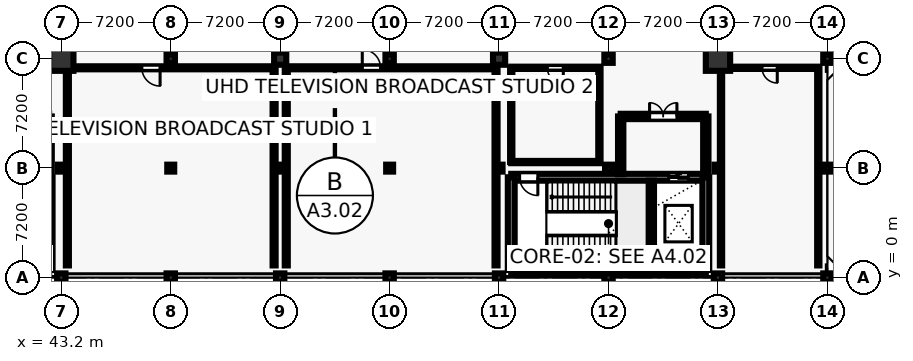
"""IFC4 building model, lengths in metres.
Left out: names, types, materials, properties, quantities, classifications, styles, units other than length and angle.
Written with IfcOpenShell. Run it as: python <this file> out.ifc"""

import sys

from ifc_helpers import new_model, si_unit, direction, frame, frame_2d, origin, origin_2d, place, context, subcontext, project, spatial, rectangle, circle, hollow_circle, extrude, element, fill, save


model = new_model("IFC4")
c1 = context("Model", 3, precision=1e-05, world=origin(), true_north=direction((0.0, 1.0)))
c2 = subcontext(c1, "Body", "Model", "MODEL_VIEW")
j1 = project(units=[si_unit("LENGTHUNIT", "METRE"), si_unit("PLANEANGLEUNIT", "RADIAN")], contexts=[c1])
p1 = place(None, origin())
s1 = spatial("IfcSite", under=j1, at=p1, CompositionType="ELEMENT")
p2 = place(p1, origin())
s2 = spatial("IfcBuilding", under=s1, at=p2, CompositionType="ELEMENT")
p3 = place(p2, frame((0.0, 0.0, 18.6)))
s3 = spatial("IfcBuildingStorey", under=s2, at=p3, CompositionType="ELEMENT", Elevation=18.6)
p4 = place(p3, frame((43.2, 0.0, 0.0), z_axis=(0.0, 0.0, 1.0), x_axis=(1.0, 0.0, 0.0)))
e1 = element("IfcColumn", 1, at=p4, inside=s3, PredefinedType="COLUMN", context=c2, shape_type="SweptSolid", body=[
    extrude(rectangle(XDim=0.55, YDim=0.55, at=origin_2d()), origin(), (0.0, 0.0, 1.0), 4.4),
])
p5 = place(p3, frame((43.2, 7.2, 0.0), z_axis=(0.0, 0.0, 1.0), x_axis=(1.0, 0.0, 0.0)))
e2 = element("IfcColumn", 2, at=p5, inside=s3, PredefinedType="COLUMN", context=c2, shape_type="SweptSolid", body=[
    extrude(hollow_circle(Radius=0.229, WallThickness=0.02, at=origin_2d()), origin(), (0.0, 0.0, 1.0), 4.4),
])
p6 = place(p3, frame((43.2, 14.4, 0.0), z_axis=(0.0, 0.0, 1.0), x_axis=(1.0, 0.0, 0.0)))
e3 = element("IfcColumn", 3, at=p6, inside=s3, PredefinedType="COLUMN", context=c2, shape_type="SweptSolid", body=[
    extrude(circle(Radius=0.8, at=origin_2d()), origin(), (0.0, 0.0, 1.0), 4.4),
])
p7 = place(p3, frame((50.4, 0.0, 0.0), z_axis=(0.0, 0.0, 1.0), x_axis=(1.0, 0.0, 0.0)))
e4 = element("IfcColumn", 4, at=p7, inside=s3, PredefinedType="COLUMN", context=c2, shape_type="SweptSolid", body=[
    extrude(rectangle(XDim=0.55, YDim=0.55, at=origin_2d()), origin(), (0.0, 0.0, 1.0), 4.4),
])
p8 = place(p3, frame((50.4, 7.2, 0.0), z_axis=(0.0, 0.0, 1.0), x_axis=(1.0, 0.0, 0.0)))
e5 = element("IfcColumn", 5, at=p8, inside=s3, PredefinedType="COLUMN", context=c2, shape_type="SweptSolid", body=[
    extrude(hollow_circle(Radius=0.229, WallThickness=0.02, at=origin_2d()), origin(), (0.0, 0.0, 1.0), 4.4),
])
for number, where, z_axis, x_axis in (
    (6, (50.4, 14.4, 0.0), (0.0, 0.0, 1.0), (1.0, 0.0, 0.0)),
    (7, (57.6, 0.0, 0.0), (0.0, 0.0, 1.0), (1.0, 0.0, 0.0)),
):
    element("IfcColumn", number, at=place(p3, frame(where, z_axis=z_axis, x_axis=x_axis)), inside=s3, PredefinedType="COLUMN", context=c2, shape_type="SweptSolid", body=[
        extrude(rectangle(XDim=0.55, YDim=0.55, at=origin_2d()), origin(), (0.0, 0.0, 1.0), 4.4),
    ])
p9 = place(p3, frame((57.6, 7.2, 0.0), z_axis=(0.0, 0.0, 1.0), x_axis=(1.0, 0.0, 0.0)))
e8 = element("IfcColumn", 8, at=p9, inside=s3, PredefinedType="COLUMN", context=c2, shape_type="SweptSolid", body=[
    extrude(hollow_circle(Radius=0.229, WallThickness=0.02, at=origin_2d()), origin(), (0.0, 0.0, 1.0), 4.4),
])
p10 = place(p3, frame((57.6, 14.4, 0.0), z_axis=(0.0, 0.0, 1.0), x_axis=(1.0, 0.0, 0.0)))
e9 = element("IfcColumn", 9, at=p10, inside=s3, PredefinedType="COLUMN", context=c2, shape_type="SweptSolid", body=[
    extrude(circle(Radius=0.4, at=origin_2d()), origin(), (0.0, 0.0, 1.0), 4.4),
])
p11 = place(p3, frame((64.8, 0.0, 0.0), z_axis=(0.0, 0.0, 1.0), x_axis=(1.0, 0.0, 0.0)))
e10 = element("IfcColumn", 10, at=p11, inside=s3, PredefinedType="COLUMN", context=c2, shape_type="SweptSolid", body=[
    extrude(rectangle(XDim=0.55, YDim=0.55, at=origin_2d()), origin(), (0.0, 0.0, 1.0), 4.4),
])
p12 = place(p3, frame((64.8, 7.2, 0.0), z_axis=(0.0, 0.0, 1.0), x_axis=(1.0, 0.0, 0.0)))
e11 = element("IfcColumn", 11, at=p12, inside=s3, PredefinedType="COLUMN", context=c2, shape_type="SweptSolid", body=[
    extrude(hollow_circle(Radius=0.229, WallThickness=0.02, at=origin_2d()), origin(), (0.0, 0.0, 1.0), 4.4),
])
for number, where, z_axis, x_axis in (
    (12, (64.8, 14.4, 0.0), (0.0, 0.0, 1.0), (1.0, 0.0, 0.0)),
    (13, (72.0, 0.0, 0.0), (0.0, 0.0, 1.0), (1.0, 0.0, 0.0)),
):
    element("IfcColumn", number, at=place(p3, frame(where, z_axis=z_axis, x_axis=x_axis)), inside=s3, PredefinedType="COLUMN", context=c2, shape_type="SweptSolid", body=[
        extrude(rectangle(XDim=0.55, YDim=0.55, at=origin_2d()), origin(), (0.0, 0.0, 1.0), 4.4),
    ])
p13 = place(p3, frame((72.0, 7.2, 0.0), z_axis=(0.0, 0.0, 1.0), x_axis=(1.0, 0.0, 0.0)))
e14 = element("IfcColumn", 14, at=p13, inside=s3, PredefinedType="COLUMN", context=c2, shape_type="SweptSolid", body=[
    extrude(hollow_circle(Radius=0.229, WallThickness=0.02, at=origin_2d()), origin(), (0.0, 0.0, 1.0), 4.4),
])
p14 = place(p3, frame((72.0, 14.4, 0.0), z_axis=(0.0, 0.0, 1.0), x_axis=(1.0, 0.0, 0.0)))
e15 = element("IfcColumn", 15, at=p14, inside=s3, PredefinedType="COLUMN", context=c2, shape_type="SweptSolid", body=[
    extrude(circle(Radius=0.4, at=origin_2d()), origin(), (0.0, 0.0, 1.0), 4.4),
])
p15 = place(p3, frame((79.2, 0.0, 0.0), z_axis=(0.0, 0.0, 1.0), x_axis=(1.0, 0.0, 0.0)))
e16 = element("IfcColumn", 16, at=p15, inside=s3, PredefinedType="COLUMN", context=c2, shape_type="SweptSolid", body=[
    extrude(rectangle(XDim=0.55, YDim=0.55, at=origin_2d()), origin(), (0.0, 0.0, 1.0), 4.4),
])
p16 = place(p3, frame((79.2, 7.2, 0.0), z_axis=(0.0, 0.0, 1.0), x_axis=(1.0, 0.0, 0.0)))
e17 = element("IfcColumn", 17, at=p16, inside=s3, PredefinedType="COLUMN", context=c2, shape_type="SweptSolid", body=[
    extrude(hollow_circle(Radius=0.229, WallThickness=0.02, at=origin_2d()), origin(), (0.0, 0.0, 1.0), 4.4),
])
for number, where, z_axis, x_axis in (
    (18, (79.2, 14.4, 0.0), (0.0, 0.0, 1.0), (1.0, 0.0, 0.0)),
    (19, (86.4, 0.0, 0.0), (0.0, 0.0, 1.0), (1.0, 0.0, 0.0)),
):
    element("IfcColumn", number, at=place(p3, frame(where, z_axis=z_axis, x_axis=x_axis)), inside=s3, PredefinedType="COLUMN", context=c2, shape_type="SweptSolid", body=[
        extrude(rectangle(XDim=0.55, YDim=0.55, at=origin_2d()), origin(), (0.0, 0.0, 1.0), 4.4),
    ])
p17 = place(p3, frame((86.4, 7.2, 0.0), z_axis=(0.0, 0.0, 1.0), x_axis=(1.0, 0.0, 0.0)))
e20 = element("IfcColumn", 20, at=p17, inside=s3, PredefinedType="COLUMN", context=c2, shape_type="SweptSolid", body=[
    extrude(hollow_circle(Radius=0.229, WallThickness=0.02, at=origin_2d()), origin(), (0.0, 0.0, 1.0), 4.4),
])
p18 = place(p3, frame((86.4, 14.4, 0.0), z_axis=(0.0, 0.0, 1.0), x_axis=(1.0, 0.0, 0.0)))
e21 = element("IfcColumn", 21, at=p18, inside=s3, PredefinedType="COLUMN", context=c2, shape_type="SweptSolid", body=[
    extrude(circle(Radius=0.8, at=origin_2d()), origin(), (0.0, 0.0, 1.0), 4.4),
])
p19 = place(p3, frame((93.6, 0.0, 0.0), z_axis=(0.0, 0.0, 1.0), x_axis=(1.0, 0.0, 0.0)))
e22 = element("IfcColumn", 22, at=p19, inside=s3, PredefinedType="COLUMN", context=c2, shape_type="SweptSolid", body=[
    extrude(rectangle(XDim=0.55, YDim=0.55, at=origin_2d()), origin(), (0.0, 0.0, 1.0), 4.4),
])
p20 = place(p3, frame((93.6, 7.2, 0.0), z_axis=(0.0, 0.0, 1.0), x_axis=(1.0, 0.0, 0.0)))
e23 = element("IfcColumn", 23, at=p20, inside=s3, PredefinedType="COLUMN", context=c2, shape_type="SweptSolid", body=[
    extrude(hollow_circle(Radius=0.229, WallThickness=0.02, at=origin_2d()), origin(), (0.0, 0.0, 1.0), 4.4),
])
p21 = place(p3, frame((93.6, 14.4, 0.0), z_axis=(0.0, 0.0, 1.0), x_axis=(1.0, 0.0, 0.0)))
e24 = element("IfcColumn", 24, at=p21, inside=s3, PredefinedType="COLUMN", context=c2, shape_type="SweptSolid", body=[
    extrude(rectangle(XDim=0.55, YDim=0.55, at=origin_2d()), origin(), (0.0, 0.0, 1.0), 4.4),
])
p22 = place(p3, frame((42.4, 0.5, 0.0), z_axis=(0.0, 0.0, 1.0), x_axis=(0.0, 1.0, 0.0)))
e25 = element("IfcWall", 25, at=p22, inside=s3, PredefinedType="SHEAR", context=c2, shape_type="SweptSolid", body=[
    extrude(rectangle(XDim=6.1, YDim=0.45, at=frame_2d((3.05, 0.0))), origin(), (0.0, 0.0, 1.0), 4.15),
])
p23 = place(p3, frame((72.8, 0.5, 0.0), z_axis=(0.0, 0.0, 1.0), x_axis=(1.0, 0.0, 0.0)))
e26 = element("IfcWall", 26, at=p23, inside=s3, PredefinedType="SHEAR", context=c2, shape_type="SweptSolid", body=[
    extrude(rectangle(XDim=12.8, YDim=0.45, at=frame_2d((6.4, 0.0))), origin(), (0.0, 0.0, 1.0), 4.15),
])
p24 = place(p3, frame((72.8, 6.6, 0.0), z_axis=(0.0, 0.0, 1.0), x_axis=(1.0, 0.0, 0.0)))
e27 = element("IfcWall", 27, at=p24, inside=s3, PredefinedType="SHEAR", context=c2, shape_type="SweptSolid", body=[
    extrude(rectangle(XDim=12.8, YDim=0.45, at=frame_2d((6.4, 0.0))), origin(), (0.0, 0.0, 1.0), 4.15),
])
p25 = place(p24, frame((0.55, 0.0, 0.0)))
e28 = element("IfcOpeningElement", 28, at=p25, cuts=e27, PredefinedType="OPENING", context=c2, shape_type="SweptSolid", body=[
    extrude(rectangle(XDim=1.2, YDim=2.25, at=frame_2d((0.6, 1.125))), frame((0.0, 0.235, 0.0), z_axis=(0.0, -1.0, 0.0), x_axis=(1.0, 0.0, 0.0)), (0.0, 0.0, 1.0), 0.47),
])
p26 = place(p24, frame((10.358, 0.0, 0.0)))
e29 = element("IfcOpeningElement", 29, at=p26, cuts=e27, PredefinedType="OPENING", context=c2, shape_type="SweptSolid", body=[
    extrude(rectangle(XDim=1.3, YDim=2.25, at=frame_2d((0.65, 1.125))), frame((0.0, 0.235, 0.0), z_axis=(0.0, -1.0, 0.0), x_axis=(1.0, 0.0, 0.0)), (0.0, 0.0, 1.0), 0.47),
])
for number, where, z_axis, x_axis in (
    (30, (72.8, 0.5, 0.0), (0.0, 0.0, 1.0), (0.0, 1.0, 0.0)),
    (31, (85.6, 0.5, 0.0), (0.0, 0.0, 1.0), (0.0, 1.0, 0.0)),
):
    element("IfcWall", number, at=place(p3, frame(where, z_axis=z_axis, x_axis=x_axis)), inside=s3, PredefinedType="SHEAR", context=c2, shape_type="SweptSolid", body=[
        extrude(rectangle(XDim=6.1, YDim=0.45, at=frame_2d((3.05, 0.0))), origin(), (0.0, 0.0, 1.0), 4.15),
    ])
p27 = place(p3, frame((82.016, 0.725, 0.0), z_axis=(0.0, 0.0, 1.0), x_axis=(0.0, 1.0, 0.0)))
e32 = element("IfcWall", 32, at=p27, inside=s3, PredefinedType="SHEAR", context=c2, shape_type="SweptSolid", body=[
    extrude(rectangle(XDim=5.65, YDim=0.35, at=frame_2d((2.825, 0.0))), origin(), (0.0, 0.0, 1.0), 4.15),
])
p28 = place(p3, frame((93.95, 14.4, 0.0), z_axis=(0.0, 0.0, 1.0), x_axis=(1.0, 0.0, 0.0)))
e33 = element("IfcWall", 33, at=p28, inside=s3, PredefinedType="SOLIDWALL", context=c2, shape_type="SweptSolid", body=[
    extrude(rectangle(XDim=13.7, YDim=0.32, at=frame_2d((6.85, 0.0))), origin(), (0.0, 0.0, 1.0), 3.21),
])
p29 = place(p3, frame((93.75, 0.15, 0.0), z_axis=(0.0, 0.0, 1.0), x_axis=(1.0, 0.0, 0.0)))
e34 = element("IfcWall", 34, at=p29, inside=s3, PredefinedType="PARAPET", context=c2, shape_type="SweptSolid", body=[
    extrude(rectangle(XDim=28.5, YDim=0.18, at=frame_2d((14.25, 0.0))), origin(), (0.0, 0.0, 1.0), 1.15),
])
p30 = place(p3, frame((85.6, 6.8, 0.0), z_axis=(0.0, 0.0, 1.0), x_axis=(0.0, 1.0, 0.0)))
e35 = element("IfcWall", 35, at=p30, inside=s3, PredefinedType="SHEAR", context=c2, shape_type="SweptSolid", body=[
    extrude(rectangle(XDim=3.8, YDim=0.35, at=frame_2d((1.9, 0.0))), origin(), (0.0, 0.0, 1.0), 3.21),
])
p31 = place(p3, frame((85.6, 10.6, 0.0), z_axis=(0.0, 0.0, 1.0), x_axis=(-1.0, 0.0, 0.0)))
e36 = element("IfcWall", 36, at=p31, inside=s3, PredefinedType="SHEAR", context=c2, shape_type="SweptSolid", body=[
    extrude(rectangle(XDim=5.6, YDim=0.35, at=frame_2d((2.8, 0.0))), origin(), (0.0, 0.0, 1.0), 3.21),
])
p32 = place(p31, frame((1.9, 0.0, 0.0)))
e37 = element("IfcOpeningElement", 37, at=p32, cuts=e36, PredefinedType="OPENING", context=c2, shape_type="SweptSolid", body=[
    extrude(rectangle(XDim=1.8, YDim=2.3, at=frame_2d((0.9, 1.15))), frame((0.0, 0.185, 0.0), z_axis=(0.0, -1.0, 0.0), x_axis=(1.0, 0.0, 0.0)), (0.0, 0.0, 1.0), 0.37),
])
p33 = place(p3, frame((80.0, 10.6, 0.0), z_axis=(0.0, 0.0, 1.0), x_axis=(0.0, -1.0, 0.0)))
e38 = element("IfcWall", 38, at=p33, inside=s3, PredefinedType="SHEAR", context=c2, shape_type="SweptSolid", body=[
    extrude(rectangle(XDim=3.8, YDim=0.35, at=frame_2d((1.9, 0.0))), origin(), (0.0, 0.0, 1.0), 3.21),
])
p34 = place(p3, frame((57.2, 0.8, 0.0), z_axis=(0.0, 0.0, 1.0), x_axis=(0.0, 1.0, 0.0)))
e39 = element("IfcWall", 39, at=p34, inside=s3, PredefinedType="PARTITIONING", context=c2, shape_type="SweptSolid", body=[
    extrude(rectangle(XDim=13.0, YDim=0.2, at=frame_2d((6.5, 0.0))), origin(), (0.0, 0.0, 1.0), 3.21),
])
p35 = place(p3, frame((57.2, 13.8, 0.0), z_axis=(0.0, 0.0, 1.0), x_axis=(-1.0, 0.0, 0.0)))
e40 = element("IfcWall", 40, at=p35, inside=s3, PredefinedType="PARTITIONING", context=c2, shape_type="SweptSolid", body=[
    extrude(rectangle(XDim=13.6, YDim=0.2, at=frame_2d((6.8, 0.0))), origin(), (0.0, 0.0, 1.0), 3.21),
])
p36 = place(p35, frame((7.5, 0.0, 0.0)))
e41 = element("IfcOpeningElement", 41, at=p36, cuts=e40, PredefinedType="OPENING", context=c2, shape_type="SweptSolid", body=[
    extrude(rectangle(XDim=1.2, YDim=2.25, at=frame_2d((0.6, 1.125))), frame((0.0, 0.11, 0.0), z_axis=(0.0, -1.0, 0.0), x_axis=(1.0, 0.0, 0.0)), (0.0, 0.0, 1.0), 0.22),
])
for number, where, z_axis, x_axis in (
    (42, (43.6, 13.8, 0.0), (0.0, 0.0, 1.0), (0.0, -1.0, 0.0)),
    (43, (71.8, 0.8, 0.0), (0.0, 0.0, 1.0), (0.0, 1.0, 0.0)),
):
    element("IfcWall", number, at=place(p3, frame(where, z_axis=z_axis, x_axis=x_axis)), inside=s3, PredefinedType="PARTITIONING", context=c2, shape_type="SweptSolid", body=[
        extrude(rectangle(XDim=13.0, YDim=0.2, at=frame_2d((6.5, 0.0))), origin(), (0.0, 0.0, 1.0), 3.21),
    ])
p37 = place(p3, frame((71.8, 13.8, 0.0), z_axis=(0.0, 0.0, 1.0), x_axis=(-1.0, 0.0, 0.0)))
e44 = element("IfcWall", 44, at=p37, inside=s3, PredefinedType="PARTITIONING", context=c2, shape_type="SweptSolid", body=[
    extrude(rectangle(XDim=13.8, YDim=0.2, at=frame_2d((6.9, 0.0))), origin(), (0.0, 0.0, 1.0), 3.21),
])
p38 = place(p37, frame((7.6, 0.0, 0.0)))
e45 = element("IfcOpeningElement", 45, at=p38, cuts=e44, PredefinedType="OPENING", context=c2, shape_type="SweptSolid", body=[
    extrude(rectangle(XDim=1.2, YDim=2.25, at=frame_2d((0.6, 1.125))), frame((0.0, 0.11, 0.0), z_axis=(0.0, -1.0, 0.0), x_axis=(1.0, 0.0, 0.0)), (0.0, 0.0, 1.0), 0.22),
])
p39 = place(p3, frame((58.0, 13.8, 0.0), z_axis=(0.0, 0.0, 1.0), x_axis=(0.0, -1.0, 0.0)))
e46 = element("IfcWall", 46, at=p39, inside=s3, PredefinedType="PARTITIONING", context=c2, shape_type="SweptSolid", body=[
    extrude(rectangle(XDim=13.0, YDim=0.2, at=frame_2d((6.5, 0.0))), origin(), (0.0, 0.0, 1.0), 3.21),
])
p40 = place(p3, frame((93.0, 0.8, 0.0), z_axis=(0.0, 0.0, 1.0), x_axis=(0.0, 1.0, 0.0)))
e47 = element("IfcWall", 47, at=p40, inside=s3, PredefinedType="PARTITIONING", context=c2, shape_type="SweptSolid", body=[
    extrude(rectangle(XDim=13.0, YDim=0.15, at=frame_2d((6.5, 0.0))), origin(), (0.0, 0.0, 1.0), 3.21),
])
p41 = place(p3, frame((93.0, 13.8, 0.0), z_axis=(0.0, 0.0, 1.0), x_axis=(-1.0, 0.0, 0.0)))
e48 = element("IfcWall", 48, at=p41, inside=s3, PredefinedType="PARTITIONING", context=c2, shape_type="SweptSolid", body=[
    extrude(rectangle(XDim=6.4, YDim=0.15, at=frame_2d((3.2, 0.0))), origin(), (0.0, 0.0, 1.0), 3.21),
])
p42 = place(p41, frame((2.7, 0.0, 0.0)))
e49 = element("IfcOpeningElement", 49, at=p42, cuts=e48, PredefinedType="OPENING", context=c2, shape_type="SweptSolid", body=[
    extrude(rectangle(XDim=1.0, YDim=2.2, at=frame_2d((0.5, 1.1))), frame((0.0, 0.085, 0.0), z_axis=(0.0, -1.0, 0.0), x_axis=(1.0, 0.0, 0.0)), (0.0, 0.0, 1.0), 0.17),
])
p43 = place(p3, frame((86.6, 13.8, 0.0), z_axis=(0.0, 0.0, 1.0), x_axis=(0.0, -1.0, 0.0)))
e50 = element("IfcWall", 50, at=p43, inside=s3, PredefinedType="PARTITIONING", context=c2, shape_type="SweptSolid", body=[
    extrude(rectangle(XDim=13.0, YDim=0.15, at=frame_2d((6.5, 0.0))), origin(), (0.0, 0.0, 1.0), 3.21),
])
p44 = place(p3, frame((72.8, 7.6, 0.0), z_axis=(0.0, 0.0, 1.0), x_axis=(1.0, 0.0, 0.0)))
e51 = element("IfcWall", 51, at=p44, inside=s3, PredefinedType="PARTITIONING", context=c2, shape_type="SweptSolid", body=[
    extrude(rectangle(XDim=5.8, YDim=0.15, at=frame_2d((2.9, 0.0))), origin(), (0.0, 0.0, 1.0), 3.21),
])
p45 = place(p3, frame((78.6, 7.6, 0.0), z_axis=(0.0, 0.0, 1.0), x_axis=(0.0, 1.0, 0.0)))
e52 = element("IfcWall", 52, at=p45, inside=s3, PredefinedType="PARTITIONING", context=c2, shape_type="SweptSolid", body=[
    extrude(rectangle(XDim=6.2, YDim=0.15, at=frame_2d((3.1, 0.0))), origin(), (0.0, 0.0, 1.0), 3.21),
])
p46 = place(p3, frame((78.6, 13.8, 0.0), z_axis=(0.0, 0.0, 1.0), x_axis=(-1.0, 0.0, 0.0)))
e53 = element("IfcWall", 53, at=p46, inside=s3, PredefinedType="PARTITIONING", context=c2, shape_type="SweptSolid", body=[
    extrude(rectangle(XDim=5.8, YDim=0.15, at=frame_2d((2.9, 0.0))), origin(), (0.0, 0.0, 1.0), 3.21),
])
p47 = place(p46, frame((2.375, 0.0, 0.0)))
e54 = element("IfcOpeningElement", 54, at=p47, cuts=e53, PredefinedType="OPENING", context=c2, shape_type="SweptSolid", body=[
    extrude(rectangle(XDim=1.05, YDim=2.2, at=frame_2d((0.525, 1.1))), frame((0.0, 0.085, 0.0), z_axis=(0.0, -1.0, 0.0), x_axis=(1.0, 0.0, 0.0)), (0.0, 0.0, 1.0), 0.17),
])
p48 = place(p3, frame((72.8, 13.8, 0.0), z_axis=(0.0, 0.0, 1.0), x_axis=(0.0, -1.0, 0.0)))
e55 = element("IfcWall", 55, at=p48, inside=s3, PredefinedType="PARTITIONING", context=c2, shape_type="SweptSolid", body=[
    extrude(rectangle(XDim=6.2, YDim=0.15, at=frame_2d((3.1, 0.0))), origin(), (0.0, 0.0, 1.0), 3.21),
])
p49 = place(p25, frame((1.2, 0.0, 0.0), z_axis=(0.0, 0.0, 1.0), x_axis=(-1.0, 0.0, 0.0)))
e56 = element("IfcDoor", 56, at=p49, inside=s3, OperationType="SINGLE_SWING_RIGHT", PredefinedType="DOOR", context=c2, shape_type="SweptSolid", body=[
    extrude(rectangle(XDim=1.2, YDim=2.25, at=frame_2d((0.6, 1.125))), frame((0.0, 0.025, 0.0), z_axis=(0.0, -1.0, 0.0), x_axis=(1.0, 0.0, 0.0)), (0.0, 0.0, 1.0), 0.05),
])
fill(e28, e56)
p50 = place(p26, origin())
e57 = element("IfcDoor", 57, at=p50, inside=s3, OperationType="SLIDING_TO_RIGHT", PredefinedType="DOOR", context=c2, shape_type="SweptSolid", body=[
    extrude(rectangle(XDim=1.3, YDim=2.25, at=frame_2d((0.65, 1.125))), frame((0.0, 0.025, 0.0), z_axis=(0.0, -1.0, 0.0), x_axis=(1.0, 0.0, 0.0)), (0.0, 0.0, 1.0), 0.05),
])
fill(e29, e57)
p51 = place(p32, frame((1.8, 0.0, 0.0), z_axis=(0.0, 0.0, 1.0), x_axis=(-1.0, 0.0, 0.0)))
e58 = element("IfcDoor", 58, at=p51, inside=s3, OperationType="DOUBLE_DOOR_SINGLE_SWING", PredefinedType="DOOR", context=c2, shape_type="SweptSolid", body=[
    extrude(rectangle(XDim=1.8, YDim=2.3, at=frame_2d((0.9, 1.15))), frame((0.0, 0.025, 0.0), z_axis=(0.0, -1.0, 0.0), x_axis=(1.0, 0.0, 0.0)), (0.0, 0.0, 1.0), 0.05),
])
fill(e37, e58)
p52 = place(p36, origin())
e59 = element("IfcDoor", 59, at=p52, inside=s3, OperationType="SINGLE_SWING_LEFT", PredefinedType="DOOR", context=c2, shape_type="SweptSolid", body=[
    extrude(rectangle(XDim=1.2, YDim=2.25, at=frame_2d((0.6, 1.125))), frame((0.0, 0.025, 0.0), z_axis=(0.0, -1.0, 0.0), x_axis=(1.0, 0.0, 0.0)), (0.0, 0.0, 1.0), 0.05),
])
fill(e41, e59)
p53 = place(p38, frame((1.2, 0.0, 0.0), z_axis=(0.0, 0.0, 1.0), x_axis=(-1.0, 0.0, 0.0)))
e60 = element("IfcDoor", 60, at=p53, inside=s3, OperationType="SINGLE_SWING_RIGHT", PredefinedType="DOOR", context=c2, shape_type="SweptSolid", body=[
    extrude(rectangle(XDim=1.2, YDim=2.25, at=frame_2d((0.6, 1.125))), frame((0.0, 0.025, 0.0), z_axis=(0.0, -1.0, 0.0), x_axis=(1.0, 0.0, 0.0)), (0.0, 0.0, 1.0), 0.05),
])
fill(e45, e60)
p54 = place(p42, origin())
e61 = element("IfcDoor", 61, at=p54, inside=s3, OperationType="SINGLE_SWING_LEFT", PredefinedType="DOOR", context=c2, shape_type="SweptSolid", body=[
    extrude(rectangle(XDim=1.0, YDim=2.2, at=frame_2d((0.5, 1.1))), frame((0.0, 0.025, 0.0), z_axis=(0.0, -1.0, 0.0), x_axis=(1.0, 0.0, 0.0)), (0.0, 0.0, 1.0), 0.05),
])
fill(e49, e61)
p55 = place(p47, origin())
e62 = element("IfcDoor", 62, at=p55, inside=s3, OperationType="SINGLE_SWING_LEFT", PredefinedType="DOOR", context=c2, shape_type="SweptSolid", body=[
    extrude(rectangle(XDim=1.05, YDim=2.2, at=frame_2d((0.525, 1.1))), frame((0.0, 0.025, 0.0), z_axis=(0.0, -1.0, 0.0), x_axis=(1.0, 0.0, 0.0)), (0.0, 0.0, 1.0), 0.05),
])
fill(e54, e62)
save(model, sys.argv[1])
